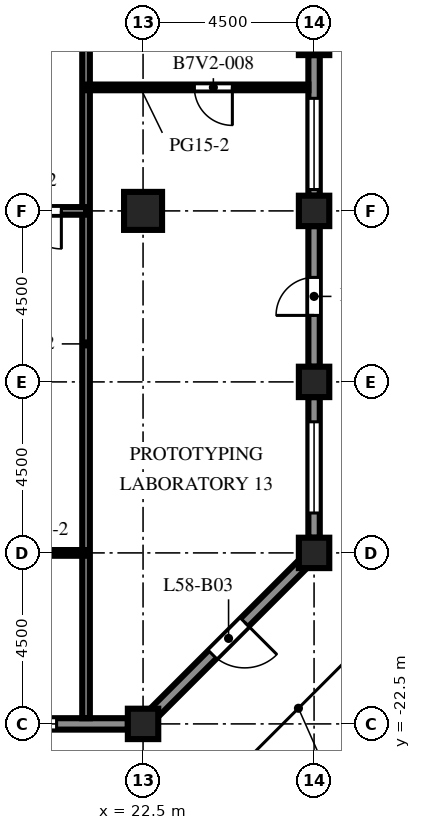
"""IFC4 building model, lengths in metres.
Left out: names, types, materials, properties, quantities, classifications, styles, units other than length and angle.
Written with IfcOpenShell. Run it as: python <this file> out.ifc"""

import sys

from ifc_helpers import new_model, si_unit, direction, frame, frame_2d, origin, origin_2d, place, context, subcontext, project, spatial, rectangle, extrude, element, fill, save


model = new_model("IFC4")
c1 = context("Model", 3, precision=1e-05, world=origin(), true_north=direction((0.0, 1.0)))
c2 = subcontext(c1, "Body", "Model", "MODEL_VIEW")
j1 = project(units=[si_unit("LENGTHUNIT", "METRE"), si_unit("PLANEANGLEUNIT", "RADIAN")], contexts=[c1])
p1 = place(None, origin())
s1 = spatial("IfcSite", under=j1, at=p1, CompositionType="ELEMENT")
p2 = place(p1, origin())
s2 = spatial("IfcBuilding", under=s1, at=p2, CompositionType="ELEMENT")
p3 = place(p2, frame((0.0, 0.0, 256.2)))
s3 = spatial("IfcBuildingStorey", under=s2, at=p3, CompositionType="ELEMENT", Elevation=256.2)
for number, where, z_axis, x_axis in (
    (1, (22.5, -22.5, 0.0), (0.0, 0.0, 1.0), (1.0, 0.0, 0.0)),
    (2, (27.0, -18.0, 0.0), (0.0, 0.0, 1.0), (1.0, 0.0, 0.0)),
    (3, (27.0, -13.5, 0.0), (0.0, 0.0, 1.0), (1.0, 0.0, 0.0)),
    (4, (27.0, -9.0, 0.0), (0.0, 0.0, 1.0), (1.0, 0.0, 0.0)),
    (5, (27.0, -4.5, 0.0), (0.0, 0.0, 1.0), (1.0, 0.0, 0.0)),
):
    element("IfcColumn", number, at=place(p3, frame(where, z_axis=z_axis, x_axis=x_axis)), inside=s3, PredefinedType="COLUMN", context=c2, shape_type="SweptSolid", body=[
        extrude(rectangle(XDim=0.8, YDim=0.8, at=origin_2d()), origin(), (0.0, 0.0, 1.0), 4.1),
    ])
p4 = place(p3, frame((22.5, -9.0, 0.0), z_axis=(0.0, 0.0, 1.0), x_axis=(1.0, 0.0, 0.0)))
e6 = element("IfcColumn", 6, at=p4, inside=s3, PredefinedType="COLUMN", context=c2, shape_type="SweptSolid", body=[
    extrude(rectangle(XDim=1.0, YDim=1.0, at=origin_2d()), origin(), (0.0, 0.0, 1.0), 4.1),
])
p5 = place(p3, frame((22.1, -22.5, 0.0), z_axis=(0.0, 0.0, 1.0), x_axis=(-1.0, 0.0, 0.0)))
e7 = element("IfcWall", 7, at=p5, inside=s3, PredefinedType="SOLIDWALL", context=c2, shape_type="SweptSolid", body=[
    extrude(rectangle(XDim=3.7, YDim=0.3, at=frame_2d((1.85, 0.0))), origin(), (0.0, 0.0, 1.0), 2.7),
])
p6 = place(p5, frame((1.875, 0.0, 0.8)))
e8 = element("IfcOpeningElement", 8, at=p6, cuts=e7, PredefinedType="OPENING", context=c2, shape_type="SweptSolid", body=[
    extrude(rectangle(XDim=1.2, YDim=1.7, at=frame_2d((0.6, 0.85))), frame((0.0, 0.16, 0.0), z_axis=(0.0, -1.0, 0.0), x_axis=(1.0, 0.0, 0.0)), (0.0, 0.0, 1.0), 0.32),
])
p7 = place(p3, frame((26.706, -18.294, 0.0), z_axis=(0.0, 0.0, 1.0), x_axis=(-0.707106781187, -0.707106781187, 0.0)))
e9 = element("IfcWall", 9, at=p7, inside=s3, PredefinedType="SOLIDWALL", context=c2, shape_type="SweptSolid", body=[
    extrude(rectangle(XDim=5.532, YDim=0.3, at=frame_2d((2.766, 0.0))), origin(), (0.0, 0.0, 1.0), 2.7),
])
p8 = place(p7, frame((2.166, 0.0, 0.0)))
e10 = element("IfcOpeningElement", 10, at=p8, cuts=e9, PredefinedType="OPENING", context=c2, shape_type="SweptSolid", body=[
    extrude(rectangle(XDim=1.2, YDim=2.2, at=frame_2d((0.6, 1.1))), frame((0.0, 0.16, 0.0), z_axis=(0.0, -1.0, 0.0), x_axis=(1.0, 0.0, 0.0)), (0.0, 0.0, 1.0), 0.32),
])
p9 = place(p3, frame((27.0, -13.9, 0.0), z_axis=(0.0, 0.0, 1.0), x_axis=(0.0, -1.0, 0.0)))
e11 = element("IfcWall", 11, at=p9, inside=s3, PredefinedType="SOLIDWALL", context=c2, shape_type="SweptSolid", body=[
    extrude(rectangle(XDim=3.7, YDim=0.3, at=frame_2d((1.85, 0.0))), origin(), (0.0, 0.0, 1.0), 2.7),
])
p10 = place(p9, frame((0.65, 0.0, 0.8)))
e12 = element("IfcOpeningElement", 12, at=p10, cuts=e11, PredefinedType="OPENING", context=c2, shape_type="SweptSolid", body=[
    extrude(rectangle(XDim=2.4, YDim=1.7, at=frame_2d((1.2, 0.85))), frame((0.0, 0.16, 0.0), z_axis=(0.0, -1.0, 0.0), x_axis=(1.0, 0.0, 0.0)), (0.0, 0.0, 1.0), 0.32),
])
p11 = place(p3, frame((27.0, -9.4, 0.0), z_axis=(0.0, 0.0, 1.0), x_axis=(0.0, -1.0, 0.0)))
e13 = element("IfcWall", 13, at=p11, inside=s3, PredefinedType="SOLIDWALL", context=c2, shape_type="SweptSolid", body=[
    extrude(rectangle(XDim=3.7, YDim=0.3, at=frame_2d((1.85, 0.0))), origin(), (0.0, 0.0, 1.0), 2.7),
])
p12 = place(p11, frame((1.35, 0.0, 0.0)))
e14 = element("IfcOpeningElement", 14, at=p12, cuts=e13, PredefinedType="OPENING", context=c2, shape_type="SweptSolid", body=[
    extrude(rectangle(XDim=1.0, YDim=2.2, at=frame_2d((0.5, 1.1))), frame((0.0, 0.16, 0.0), z_axis=(0.0, -1.0, 0.0), x_axis=(1.0, 0.0, 0.0)), (0.0, 0.0, 1.0), 0.32),
])
p13 = place(p3, frame((27.0, -4.9, 0.0), z_axis=(0.0, 0.0, 1.0), x_axis=(0.0, -1.0, 0.0)))
e15 = element("IfcWall", 15, at=p13, inside=s3, PredefinedType="SOLIDWALL", context=c2, shape_type="SweptSolid", body=[
    extrude(rectangle(XDim=3.7, YDim=0.3, at=frame_2d((1.85, 0.0))), origin(), (0.0, 0.0, 1.0), 2.7),
])
p14 = place(p13, frame((1.137, 0.0, 0.8)))
e16 = element("IfcOpeningElement", 16, at=p14, cuts=e15, PredefinedType="OPENING", context=c2, shape_type="SweptSolid", body=[
    extrude(rectangle(XDim=2.4, YDim=1.7, at=frame_2d((1.2, 0.85))), frame((0.0, 0.16, 0.0), z_axis=(0.0, -1.0, 0.0), x_axis=(1.0, 0.0, 0.0)), (0.0, 0.0, 1.0), 0.32),
])
p15 = place(p3, frame((21.0, 3.25, 0.0), z_axis=(0.0, 0.0, 1.0), x_axis=(0.0, -1.0, 0.0)))
e17 = element("IfcWall", 17, at=p15, inside=s3, PredefinedType="PARTITIONING", context=c2, shape_type="SweptSolid", body=[
    extrude(rectangle(XDim=25.6, YDim=0.2, at=frame_2d((12.8, 0.0))), origin(), (0.0, 0.0, 1.0), 3.5),
])
p16 = place(p15, frame((4.9, 0.0, 0.0)))
e18 = element("IfcOpeningElement", 18, at=p16, cuts=e17, PredefinedType="OPENING", context=c2, shape_type="SweptSolid", body=[
    extrude(rectangle(XDim=1.0, YDim=2.1, at=frame_2d((0.5, 1.05))), frame((0.0, 0.11, 0.0), z_axis=(0.0, -1.0, 0.0), x_axis=(1.0, 0.0, 0.0)), (0.0, 0.0, 1.0), 0.22),
])
p17 = place(p3, frame((18.5, -18.0, 0.0), z_axis=(0.0, 0.0, 1.0), x_axis=(1.0, 0.0, 0.0)))
e19 = element("IfcWall", 19, at=p17, inside=s3, PredefinedType="PARTITIONING", context=c2, shape_type="SweptSolid", body=[
    extrude(rectangle(XDim=2.5, YDim=0.15, at=frame_2d((1.25, 0.0))), origin(), (0.0, 0.0, 1.0), 3.5),
])
p18 = place(p3, frame((21.0, -9.0, 0.0), z_axis=(0.0, 0.0, 1.0), x_axis=(-1.0, 0.0, 0.0)))
e20 = element("IfcWall", 20, at=p18, inside=s3, PredefinedType="PARTITIONING", context=c2, shape_type="SweptSolid", body=[
    extrude(rectangle(XDim=3.0, YDim=0.2, at=frame_2d((1.5, 0.0))), origin(), (0.0, 0.0, 1.0), 3.5),
])
p19 = place(p18, frame((0.65, 0.0, 0.0)))
e21 = element("IfcOpeningElement", 21, at=p19, cuts=e20, PredefinedType="OPENING", context=c2, shape_type="SweptSolid", body=[
    extrude(rectangle(XDim=1.0, YDim=2.1, at=frame_2d((0.5, 1.05))), frame((0.0, 0.11, 0.0), z_axis=(0.0, -1.0, 0.0), x_axis=(1.0, 0.0, 0.0)), (0.0, 0.0, 1.0), 0.22),
])
p20 = place(p3, frame((26.85, -5.75, 0.0), z_axis=(0.0, 0.0, 1.0), x_axis=(-1.0, 0.0, 0.0)))
e22 = element("IfcWall", 22, at=p20, inside=s3, PredefinedType="PARTITIONING", context=c2, shape_type="SweptSolid", body=[
    extrude(rectangle(XDim=5.85, YDim=0.15, at=frame_2d((2.925, 0.0))), origin(), (0.0, 0.0, 1.0), 3.5),
])
p21 = place(p20, frame((2.0, 0.0, 0.0)))
e23 = element("IfcOpeningElement", 23, at=p21, cuts=e22, PredefinedType="OPENING", context=c2, shape_type="SweptSolid", body=[
    extrude(rectangle(XDim=1.0, YDim=2.1, at=frame_2d((0.5, 1.05))), frame((0.0, 0.085, 0.0), z_axis=(0.0, -1.0, 0.0), x_axis=(1.0, 0.0, 0.0)), (0.0, 0.0, 1.0), 0.17),
])
p22 = place(p6, origin())
e24 = element("IfcWindow", 24, at=p22, inside=s3, PartitioningType="SINGLE_PANEL", PredefinedType="WINDOW", context=c2, shape_type="SweptSolid", body=[
    extrude(rectangle(XDim=1.2, YDim=1.7, at=frame_2d((0.6, 0.85))), frame((0.0, 0.03, 0.0), z_axis=(0.0, -1.0, 0.0), x_axis=(1.0, 0.0, 0.0)), (0.0, 0.0, 1.0), 0.06),
])
fill(e8, e24)
p23 = place(p8, origin())
e25 = element("IfcDoor", 25, at=p23, inside=s3, OperationType="SINGLE_SWING_LEFT", PredefinedType="DOOR", context=c2, shape_type="SweptSolid", body=[
    extrude(rectangle(XDim=1.2, YDim=2.2, at=frame_2d((0.6, 1.1))), frame((0.0, 0.025, 0.0), z_axis=(0.0, -1.0, 0.0), x_axis=(1.0, 0.0, 0.0)), (0.0, 0.0, 1.0), 0.05),
])
fill(e10, e25)
p24 = place(p10, origin())
e26 = element("IfcWindow", 26, at=p24, inside=s3, PartitioningType="SINGLE_PANEL", PredefinedType="WINDOW", context=c2, shape_type="SweptSolid", body=[
    extrude(rectangle(XDim=2.4, YDim=1.7, at=frame_2d((1.2, 0.85))), frame((0.0, 0.03, 0.0), z_axis=(0.0, -1.0, 0.0), x_axis=(1.0, 0.0, 0.0)), (0.0, 0.0, 1.0), 0.06),
])
fill(e12, e26)
p25 = place(p12, origin())
e27 = element("IfcDoor", 27, at=p25, inside=s3, OperationType="SINGLE_SWING_RIGHT", PredefinedType="DOOR", context=c2, shape_type="SweptSolid", body=[
    extrude(rectangle(XDim=1.0, YDim=2.2, at=frame_2d((0.5, 1.1))), frame((0.0, 0.025, 0.0), z_axis=(0.0, -1.0, 0.0), x_axis=(1.0, 0.0, 0.0)), (0.0, 0.0, 1.0), 0.05),
])
fill(e14, e27)
p26 = place(p14, origin())
e28 = element("IfcWindow", 28, at=p26, inside=s3, PartitioningType="SINGLE_PANEL", PredefinedType="WINDOW", context=c2, shape_type="SweptSolid", body=[
    extrude(rectangle(XDim=2.4, YDim=1.7, at=frame_2d((1.2, 0.85))), frame((0.0, 0.03, 0.0), z_axis=(0.0, -1.0, 0.0), x_axis=(1.0, 0.0, 0.0)), (0.0, 0.0, 1.0), 0.06),
])
fill(e16, e28)
p27 = place(p19, origin())
e29 = element("IfcDoor", 29, at=p27, inside=s3, OperationType="SINGLE_SWING_LEFT", PredefinedType="DOOR", context=c2, shape_type="SweptSolid", body=[
    extrude(rectangle(XDim=1.0, YDim=2.1, at=frame_2d((0.5, 1.05))), frame((0.0, 0.025, 0.0), z_axis=(0.0, -1.0, 0.0), x_axis=(1.0, 0.0, 0.0)), (0.0, 0.0, 1.0), 0.05),
])
fill(e21, e29)
p28 = place(p21, origin())
e30 = element("IfcDoor", 30, at=p28, inside=s3, OperationType="SINGLE_SWING_LEFT", PredefinedType="DOOR", context=c2, shape_type="SweptSolid", body=[
    extrude(rectangle(XDim=1.0, YDim=2.1, at=frame_2d((0.5, 1.05))), frame((0.0, 0.025, 0.0), z_axis=(0.0, -1.0, 0.0), x_axis=(1.0, 0.0, 0.0)), (0.0, 0.0, 1.0), 0.05),
])
fill(e23, e30)
save(model, sys.argv[1])
